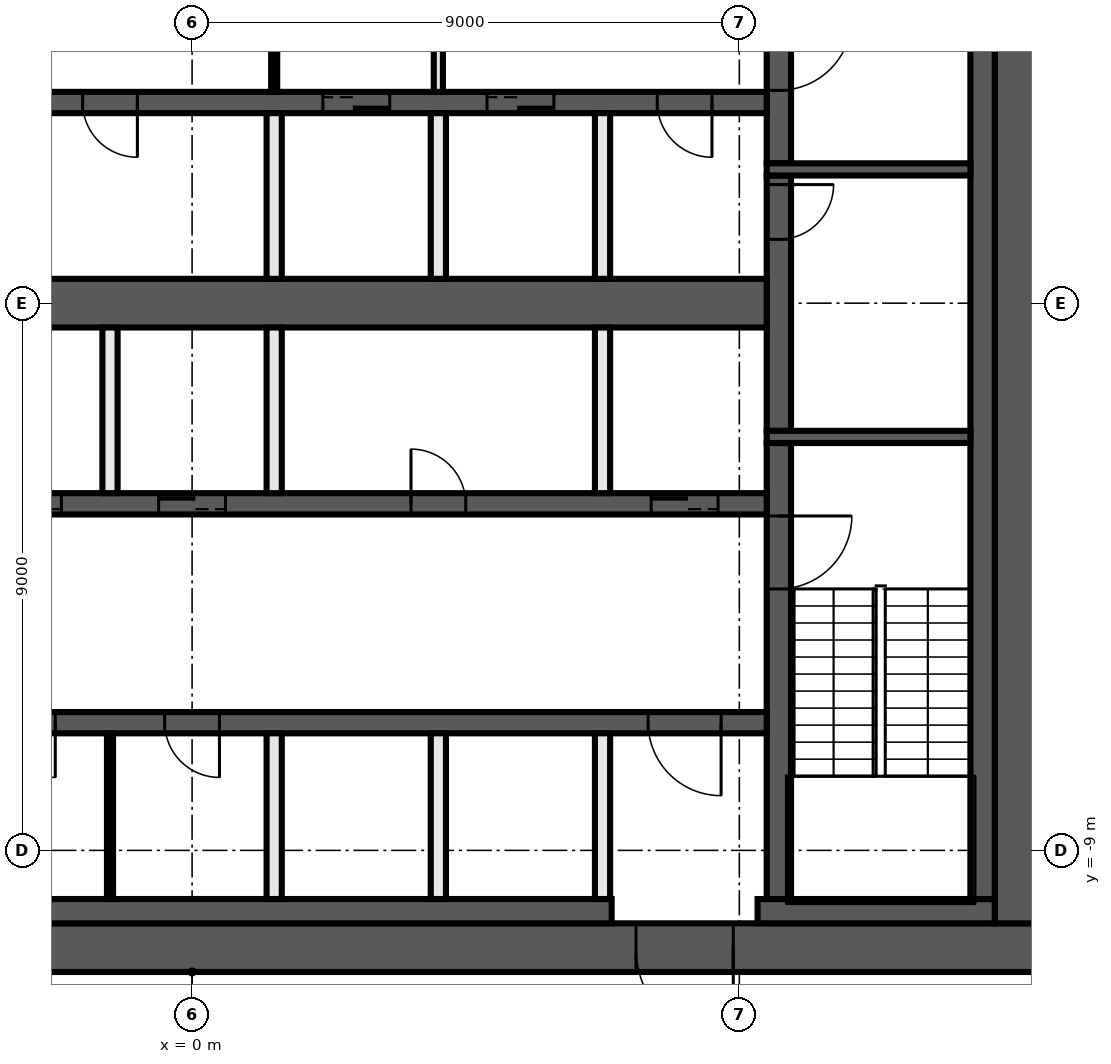
"""IFC4 building model, lengths in metres.
Left out: names, types, materials, properties, quantities, classifications, styles, units other than length and angle.
Written with IfcOpenShell. Run it as: python <this file> out.ifc"""

import sys

from ifc_helpers import new_model, si_unit, direction, frame, frame_2d, origin, place, context, subcontext, project, spatial, rectangle, extrude, element, fill, save


model = new_model("IFC4")
c1 = context("Model", 3, precision=1e-05, world=origin(), true_north=direction((0.0, 1.0)))
c2 = subcontext(c1, "Body", "Model", "MODEL_VIEW")
j1 = project(units=[si_unit("LENGTHUNIT", "METRE"), si_unit("PLANEANGLEUNIT", "RADIAN")], contexts=[c1])
p1 = place(None, origin())
s1 = spatial("IfcSite", under=j1, at=p1, CompositionType="ELEMENT")
p2 = place(p1, origin())
s2 = spatial("IfcBuilding", under=s1, at=p2, CompositionType="ELEMENT")
p3 = place(p2, frame((0.0, 0.0, 211.4)))
s3 = spatial("IfcBuildingStorey", under=s2, at=p3, CompositionType="ELEMENT", Elevation=211.4)
p4 = place(p3, frame((14.0, -10.6, 0.0), z_axis=(0.0, 0.0, 1.0), x_axis=(-1.0, 0.0, 0.0)))
e1 = element("IfcWall", 1, at=p4, inside=s3, PredefinedType="SHEAR", context=c2, shape_type="SweptSolid", body=[
    extrude(rectangle(XDim=28.0, YDim=0.8, at=frame_2d((14.0, 0.0))), origin(), (0.0, 0.0, 1.0), 3.82),
])
p5 = place(p4, frame((5.1, 0.0, 0.0)))
e2 = element("IfcOpeningElement", 2, at=p5, cuts=e1, PredefinedType="OPENING", context=c2, shape_type="SweptSolid", body=[
    extrude(rectangle(XDim=1.6, YDim=2.1, at=frame_2d((0.8, 1.05))), frame((0.0, 0.41, 0.0), z_axis=(0.0, -1.0, 0.0), x_axis=(1.0, 0.0, 0.0)), (0.0, 0.0, 1.0), 0.82),
])
p6 = place(p3, frame((13.6, 10.2, 0.0), z_axis=(0.0, 0.0, 1.0), x_axis=(0.0, -1.0, 0.0)))
e3 = element("IfcWall", 3, at=p6, inside=s3, PredefinedType="SHEAR", context=c2, shape_type="SweptSolid", body=[
    extrude(rectangle(XDim=20.4, YDim=0.8, at=frame_2d((10.2, 0.0))), origin(), (0.0, 0.0, 1.0), 3.82),
])
p7 = place(p3, frame((13.2, -10.0, 0.0), z_axis=(0.0, 0.0, 1.0), x_axis=(-1.0, 0.0, 0.0)))
e4 = element("IfcWall", 4, at=p7, inside=s3, PredefinedType="SHEAR", context=c2, shape_type="SweptSolid", body=[
    extrude(rectangle(XDim=3.9, YDim=0.4, at=frame_2d((1.95, 0.0))), origin(), (0.0, 0.0, 1.0), 3.82),
])
p8 = place(p3, frame((6.9, -10.0, 0.0), z_axis=(0.0, 0.0, 1.0), x_axis=(-1.0, 0.0, 0.0)))
e5 = element("IfcWall", 5, at=p8, inside=s3, PredefinedType="SHEAR", context=c2, shape_type="SweptSolid", body=[
    extrude(rectangle(XDim=20.1, YDim=0.4, at=frame_2d((10.05, 0.0))), origin(), (0.0, 0.0, 1.0), 3.82),
])
p9 = place(p3, frame((13.0, 9.8, 0.0), z_axis=(0.0, 0.0, 1.0), x_axis=(0.0, -1.0, 0.0)))
e6 = element("IfcWall", 6, at=p9, inside=s3, PredefinedType="SHEAR", context=c2, shape_type="SweptSolid", body=[
    extrude(rectangle(XDim=19.6, YDim=0.4, at=frame_2d((9.8, 0.0))), origin(), (0.0, 0.0, 1.0), 3.82),
])
p10 = place(p3, frame((9.65, -2.3, 0.0), z_axis=(0.0, 0.0, 1.0), x_axis=(0.0, -1.0, 0.0)))
e7 = element("IfcWall", 7, at=p10, inside=s3, PredefinedType="SHEAR", context=c2, shape_type="SweptSolid", body=[
    extrude(rectangle(XDim=7.5, YDim=0.4, at=frame_2d((3.75, 0.0))), origin(), (0.0, 0.0, 1.0), 3.82),
])
p11 = place(p10, frame((1.2, 0.0, 0.0)))
e8 = element("IfcOpeningElement", 8, at=p11, cuts=e7, PredefinedType="OPENING", context=c2, shape_type="SweptSolid", body=[
    extrude(rectangle(XDim=1.2, YDim=2.1, at=frame_2d((0.6, 1.05))), frame((0.0, 0.21, 0.0), z_axis=(0.0, -1.0, 0.0), x_axis=(1.0, 0.0, 0.0)), (0.0, 0.0, 1.0), 0.42),
])
p12 = place(p3, frame((9.65, 2.1, 0.0), z_axis=(0.0, 0.0, 1.0), x_axis=(0.0, -1.0, 0.0)))
e9 = element("IfcWall", 9, at=p12, inside=s3, PredefinedType="SHEAR", context=c2, shape_type="SweptSolid", body=[
    extrude(rectangle(XDim=4.2, YDim=0.4, at=frame_2d((2.1, 0.0))), origin(), (0.0, 0.0, 1.0), 3.82),
])
p13 = place(p12, frame((0.15, 0.0, 0.0)))
e10 = element("IfcOpeningElement", 10, at=p13, cuts=e9, PredefinedType="OPENING", context=c2, shape_type="SweptSolid", body=[
    extrude(rectangle(XDim=0.9, YDim=2.1, at=frame_2d((0.45, 1.05))), frame((0.0, 0.21, 0.0), z_axis=(0.0, -1.0, 0.0), x_axis=(1.0, 0.0, 0.0)), (0.0, 0.0, 1.0), 0.42),
])
p14 = place(p3, frame((9.65, 9.8, 0.0), z_axis=(0.0, 0.0, 1.0), x_axis=(0.0, -1.0, 0.0)))
e11 = element("IfcWall", 11, at=p14, inside=s3, PredefinedType="SHEAR", context=c2, shape_type="SweptSolid", body=[
    extrude(rectangle(XDim=7.5, YDim=0.4, at=frame_2d((3.75, 0.0))), origin(), (0.0, 0.0, 1.0), 3.82),
])
p15 = place(p14, frame((5.1, 0.0, 0.0)))
e12 = element("IfcOpeningElement", 12, at=p15, cuts=e11, PredefinedType="OPENING", context=c2, shape_type="SweptSolid", body=[
    extrude(rectangle(XDim=1.2, YDim=2.1, at=frame_2d((0.6, 1.05))), frame((0.0, 0.21, 0.0), z_axis=(0.0, -1.0, 0.0), x_axis=(1.0, 0.0, 0.0)), (0.0, 0.0, 1.0), 0.42),
])
for number, where, z_axis, x_axis in (
    (13, (9.45, 2.2, 0.0), (0.0, 0.0, 1.0), (1.0, 0.0, 0.0)),
    (14, (9.45, -2.2, 0.0), (0.0, 0.0, 1.0), (1.0, 0.0, 0.0)),
):
    element("IfcWall", number, at=place(p3, frame(where, z_axis=z_axis, x_axis=x_axis)), inside=s3, PredefinedType="SHEAR", context=c2, shape_type="SweptSolid", body=[
        extrude(rectangle(XDim=3.35, YDim=0.2, at=frame_2d((1.675, 0.0))), origin(), (0.0, 0.0, 1.0), 3.82),
    ])
p16 = place(p3, frame((9.45, 3.3, 0.0), z_axis=(0.0, 0.0, 1.0), x_axis=(-1.0, 0.0, 0.0)))
e15 = element("IfcWall", 15, at=p16, inside=s3, PredefinedType="SHEAR", context=c2, shape_type="SweptSolid", body=[
    extrude(rectangle(XDim=18.9, YDim=0.35, at=frame_2d((9.45, 0.0))), origin(), (0.0, 0.0, 1.0), 3.82),
])
p17 = place(p16, frame((6.2, 0.0, 0.0)))
e16 = element("IfcOpeningElement", 16, at=p17, cuts=e15, PredefinedType="OPENING", context=c2, shape_type="SweptSolid", body=[
    extrude(rectangle(XDim=1.1, YDim=2.1, at=frame_2d((0.55, 1.05))), frame((0.0, 0.185, 0.0), z_axis=(0.0, -1.0, 0.0), x_axis=(1.0, 0.0, 0.0)), (0.0, 0.0, 1.0), 0.37),
])
p18 = place(p16, frame((3.5, 0.0, 0.0)))
e17 = element("IfcOpeningElement", 17, at=p18, cuts=e15, PredefinedType="OPENING", context=c2, shape_type="SweptSolid", body=[
    extrude(rectangle(XDim=1.1, YDim=2.1, at=frame_2d((0.55, 1.05))), frame((0.0, 0.185, 0.0), z_axis=(0.0, -1.0, 0.0), x_axis=(1.0, 0.0, 0.0)), (0.0, 0.0, 1.0), 0.37),
])
p19 = place(p16, frame((0.9, 0.0, 0.0)))
e18 = element("IfcOpeningElement", 18, at=p19, cuts=e15, PredefinedType="OPENING", context=c2, shape_type="SweptSolid", body=[
    extrude(rectangle(XDim=0.9, YDim=2.1, at=frame_2d((0.45, 1.05))), frame((0.0, 0.185, 0.0), z_axis=(0.0, -1.0, 0.0), x_axis=(1.0, 0.0, 0.0)), (0.0, 0.0, 1.0), 0.37),
])
p20 = place(p16, frame((17.1, 0.0, 0.0)))
e19 = element("IfcOpeningElement", 19, at=p20, cuts=e15, PredefinedType="OPENING", context=c2, shape_type="SweptSolid", body=[
    extrude(rectangle(XDim=0.9, YDim=2.1, at=frame_2d((0.45, 1.05))), frame((0.0, 0.185, 0.0), z_axis=(0.0, -1.0, 0.0), x_axis=(1.0, 0.0, 0.0)), (0.0, 0.0, 1.0), 0.37),
])
p21 = place(p16, frame((14.4, 0.0, 0.0)))
e20 = element("IfcOpeningElement", 20, at=p21, cuts=e15, PredefinedType="OPENING", context=c2, shape_type="SweptSolid", body=[
    extrude(rectangle(XDim=0.9, YDim=2.1, at=frame_2d((0.45, 1.05))), frame((0.0, 0.185, 0.0), z_axis=(0.0, -1.0, 0.0), x_axis=(1.0, 0.0, 0.0)), (0.0, 0.0, 1.0), 0.37),
])
p22 = place(p16, frame((10.35, 0.0, 0.0)))
e21 = element("IfcOpeningElement", 21, at=p22, cuts=e15, PredefinedType="OPENING", context=c2, shape_type="SweptSolid", body=[
    extrude(rectangle(XDim=0.9, YDim=2.1, at=frame_2d((0.45, 1.05))), frame((0.0, 0.185, 0.0), z_axis=(0.0, -1.0, 0.0), x_axis=(1.0, 0.0, 0.0)), (0.0, 0.0, 1.0), 0.37),
])
p23 = place(p3, frame((-9.45, -3.3, 0.0), z_axis=(0.0, 0.0, 1.0), x_axis=(1.0, 0.0, 0.0)))
e22 = element("IfcWall", 22, at=p23, inside=s3, PredefinedType="SHEAR", context=c2, shape_type="SweptSolid", body=[
    extrude(rectangle(XDim=18.9, YDim=0.35, at=frame_2d((9.45, 0.0))), origin(), (0.0, 0.0, 1.0), 3.82),
])
p24 = place(p23, frame((0.8, 0.0, 0.0)))
e23 = element("IfcOpeningElement", 23, at=p24, cuts=e22, PredefinedType="OPENING", context=c2, shape_type="SweptSolid", body=[
    extrude(rectangle(XDim=1.1, YDim=2.1, at=frame_2d((0.55, 1.05))), frame((0.0, 0.185, 0.0), z_axis=(0.0, -1.0, 0.0), x_axis=(1.0, 0.0, 0.0)), (0.0, 0.0, 1.0), 0.37),
])
p25 = place(p23, frame((3.5, 0.0, 0.0)))
e24 = element("IfcOpeningElement", 24, at=p25, cuts=e22, PredefinedType="OPENING", context=c2, shape_type="SweptSolid", body=[
    extrude(rectangle(XDim=1.1, YDim=2.1, at=frame_2d((0.55, 1.05))), frame((0.0, 0.185, 0.0), z_axis=(0.0, -1.0, 0.0), x_axis=(1.0, 0.0, 0.0)), (0.0, 0.0, 1.0), 0.37),
])
p26 = place(p23, frame((6.2, 0.0, 0.0)))
e25 = element("IfcOpeningElement", 25, at=p26, cuts=e22, PredefinedType="OPENING", context=c2, shape_type="SweptSolid", body=[
    extrude(rectangle(XDim=1.1, YDim=2.1, at=frame_2d((0.55, 1.05))), frame((0.0, 0.185, 0.0), z_axis=(0.0, -1.0, 0.0), x_axis=(1.0, 0.0, 0.0)), (0.0, 0.0, 1.0), 0.37),
])
p27 = place(p23, frame((8.9, 0.0, 0.0)))
e26 = element("IfcOpeningElement", 26, at=p27, cuts=e22, PredefinedType="OPENING", context=c2, shape_type="SweptSolid", body=[
    extrude(rectangle(XDim=1.1, YDim=2.1, at=frame_2d((0.55, 1.05))), frame((0.0, 0.185, 0.0), z_axis=(0.0, -1.0, 0.0), x_axis=(1.0, 0.0, 0.0)), (0.0, 0.0, 1.0), 0.37),
])
p28 = place(p23, frame((17.0, 0.0, 0.0)))
e27 = element("IfcOpeningElement", 27, at=p28, cuts=e22, PredefinedType="OPENING", context=c2, shape_type="SweptSolid", body=[
    extrude(rectangle(XDim=1.1, YDim=2.1, at=frame_2d((0.55, 1.05))), frame((0.0, 0.185, 0.0), z_axis=(0.0, -1.0, 0.0), x_axis=(1.0, 0.0, 0.0)), (0.0, 0.0, 1.0), 0.37),
])
p29 = place(p23, frame((13.05, 0.0, 0.0)))
e28 = element("IfcOpeningElement", 28, at=p29, cuts=e22, PredefinedType="OPENING", context=c2, shape_type="SweptSolid", body=[
    extrude(rectangle(XDim=0.9, YDim=2.1, at=frame_2d((0.45, 1.05))), frame((0.0, 0.185, 0.0), z_axis=(0.0, -1.0, 0.0), x_axis=(1.0, 0.0, 0.0)), (0.0, 0.0, 1.0), 0.37),
])
p30 = place(p3, frame((9.45, -6.9, 0.0), z_axis=(0.0, 0.0, 1.0), x_axis=(-1.0, 0.0, 0.0)))
e29 = element("IfcWall", 29, at=p30, inside=s3, PredefinedType="SHEAR", context=c2, shape_type="SweptSolid", body=[
    extrude(rectangle(XDim=18.9, YDim=0.35, at=frame_2d((9.45, 0.0))), origin(), (0.0, 0.0, 1.0), 3.82),
])
p31 = place(p30, frame((0.75, 0.0, 0.0)))
e30 = element("IfcOpeningElement", 30, at=p31, cuts=e29, PredefinedType="OPENING", context=c2, shape_type="SweptSolid", body=[
    extrude(rectangle(XDim=1.2, YDim=2.1, at=frame_2d((0.6, 1.05))), frame((0.0, 0.185, 0.0), z_axis=(0.0, -1.0, 0.0), x_axis=(1.0, 0.0, 0.0)), (0.0, 0.0, 1.0), 0.37),
])
p32 = place(p30, frame((15.75, 0.0, 0.0)))
e31 = element("IfcOpeningElement", 31, at=p32, cuts=e29, PredefinedType="OPENING", context=c2, shape_type="SweptSolid", body=[
    extrude(rectangle(XDim=0.9, YDim=2.1, at=frame_2d((0.45, 1.05))), frame((0.0, 0.185, 0.0), z_axis=(0.0, -1.0, 0.0), x_axis=(1.0, 0.0, 0.0)), (0.0, 0.0, 1.0), 0.37),
])
p33 = place(p30, frame((11.7, 0.0, 0.0)))
e32 = element("IfcOpeningElement", 32, at=p33, cuts=e29, PredefinedType="OPENING", context=c2, shape_type="SweptSolid", body=[
    extrude(rectangle(XDim=0.9, YDim=2.1, at=frame_2d((0.45, 1.05))), frame((0.0, 0.185, 0.0), z_axis=(0.0, -1.0, 0.0), x_axis=(1.0, 0.0, 0.0)), (0.0, 0.0, 1.0), 0.37),
])
p34 = place(p30, frame((9.0, 0.0, 0.0)))
e33 = element("IfcOpeningElement", 33, at=p34, cuts=e29, PredefinedType="OPENING", context=c2, shape_type="SweptSolid", body=[
    extrude(rectangle(XDim=0.9, YDim=2.1, at=frame_2d((0.45, 1.05))), frame((0.0, 0.185, 0.0), z_axis=(0.0, -1.0, 0.0), x_axis=(1.0, 0.0, 0.0)), (0.0, 0.0, 1.0), 0.37),
])
p35 = place(p3, frame((-9.45, 0.0, 0.0), z_axis=(0.0, 0.0, 1.0), x_axis=(1.0, 0.0, 0.0)))
e34 = element("IfcWall", 34, at=p35, inside=s3, PredefinedType="SHEAR", context=c2, shape_type="SweptSolid", body=[
    extrude(rectangle(XDim=18.9, YDim=0.8, at=frame_2d((9.45, 0.0))), origin(), (0.0, 0.0, 1.0), 3.82),
])
for number, where, z_axis, x_axis in (
    (35, (6.75, -9.8, 0.0), (0.0, 0.0, 1.0), (0.0, 1.0, 0.0)),
    (36, (6.75, -3.125, 0.0), (0.0, 0.0, 1.0), (0.0, 1.0, 0.0)),
    (37, (6.75, 0.4, 0.0), (0.0, 0.0, 1.0), (0.0, 1.0, 0.0)),
):
    element("IfcWall", number, at=place(p3, frame(where, z_axis=z_axis, x_axis=x_axis)), inside=s3, PredefinedType="SOLIDWALL", context=c2, shape_type="SweptSolid", body=[
        extrude(rectangle(XDim=2.725, YDim=0.25, at=frame_2d((1.363, 0.0))), origin(), (0.0, 0.0, 1.0), 3.82),
    ])
p36 = place(p3, frame((4.05, 6.725, 0.0), z_axis=(0.0, 0.0, 1.0), x_axis=(0.0, -1.0, 0.0)))
e38 = element("IfcWall", 38, at=p36, inside=s3, PredefinedType="PARTITIONING", context=c2, shape_type="SweptSolid", body=[
    extrude(rectangle(XDim=3.25, YDim=0.15, at=frame_2d((1.625, 0.0))), origin(), (0.0, 0.0, 1.0), 3.82),
])
p37 = place(p36, frame((1.025, 0.0, 0.0)))
e39 = element("IfcOpeningElement", 39, at=p37, cuts=e38, PredefinedType="OPENING", context=c2, shape_type="SweptSolid", body=[
    extrude(rectangle(XDim=1.2, YDim=2.1, at=frame_2d((0.6, 1.05))), frame((0.0, 0.085, 0.0), z_axis=(0.0, -1.0, 0.0), x_axis=(1.0, 0.0, 0.0)), (0.0, 0.0, 1.0), 0.17),
])
for number, where, z_axis, x_axis in (
    (40, (4.05, -9.8, 0.0), (0.0, 0.0, 1.0), (0.0, 1.0, 0.0)),
    (41, (4.05, 0.4, 0.0), (0.0, 0.0, 1.0), (0.0, 1.0, 0.0)),
):
    element("IfcWall", number, at=place(p3, frame(where, z_axis=z_axis, x_axis=x_axis)), inside=s3, PredefinedType="SOLIDWALL", context=c2, shape_type="SweptSolid", body=[
        extrude(rectangle(XDim=2.725, YDim=0.25, at=frame_2d((1.363, 0.0))), origin(), (0.0, 0.0, 1.0), 3.82),
    ])
p38 = place(p3, frame((1.35, 6.725, 0.0), z_axis=(0.0, 0.0, 1.0), x_axis=(0.0, -1.0, 0.0)))
e42 = element("IfcWall", 42, at=p38, inside=s3, PredefinedType="PARTITIONING", context=c2, shape_type="SweptSolid", body=[
    extrude(rectangle(XDim=3.25, YDim=0.1, at=frame_2d((1.625, 0.0))), origin(), (0.0, 0.0, 1.0), 3.82),
])
p39 = place(p38, frame((1.025, 0.0, 0.0)))
e43 = element("IfcOpeningElement", 43, at=p39, cuts=e42, PredefinedType="OPENING", context=c2, shape_type="SweptSolid", body=[
    extrude(rectangle(XDim=1.2, YDim=2.1, at=frame_2d((0.6, 1.05))), frame((0.0, 0.06, 0.0), z_axis=(0.0, -1.0, 0.0), x_axis=(1.0, 0.0, 0.0)), (0.0, 0.0, 1.0), 0.12),
])
for number, where, z_axis, x_axis in (
    (44, (1.35, -9.8, 0.0), (0.0, 0.0, 1.0), (0.0, 1.0, 0.0)),
    (45, (1.35, -3.125, 0.0), (0.0, 0.0, 1.0), (0.0, 1.0, 0.0)),
    (46, (1.35, 0.4, 0.0), (0.0, 0.0, 1.0), (0.0, 1.0, 0.0)),
):
    element("IfcWall", number, at=place(p3, frame(where, z_axis=z_axis, x_axis=x_axis)), inside=s3, PredefinedType="SOLIDWALL", context=c2, shape_type="SweptSolid", body=[
        extrude(rectangle(XDim=2.725, YDim=0.25, at=frame_2d((1.363, 0.0))), origin(), (0.0, 0.0, 1.0), 3.82),
    ])
p40 = place(p3, frame((-1.35, -9.8, 0.0), z_axis=(0.0, 0.0, 1.0), x_axis=(0.0, 1.0, 0.0)))
e47 = element("IfcWall", 47, at=p40, inside=s3, PredefinedType="PARTITIONING", context=c2, shape_type="SweptSolid", body=[
    extrude(rectangle(XDim=2.725, YDim=0.1, at=frame_2d((1.363, 0.0))), origin(), (0.0, 0.0, 1.0), 3.82),
])
p41 = place(p3, frame((-1.35, -3.125, 0.0), z_axis=(0.0, 0.0, 1.0), x_axis=(0.0, 1.0, 0.0)))
e48 = element("IfcWall", 48, at=p41, inside=s3, PredefinedType="SOLIDWALL", context=c2, shape_type="SweptSolid", body=[
    extrude(rectangle(XDim=2.725, YDim=0.25, at=frame_2d((1.363, 0.0))), origin(), (0.0, 0.0, 1.0), 3.82),
])
p42 = place(p13, origin())
e49 = element("IfcDoor", 49, at=p42, inside=s3, OperationType="SINGLE_SWING_RIGHT", PredefinedType="DOOR", context=c2, shape_type="SweptSolid", body=[
    extrude(rectangle(XDim=0.9, YDim=2.1, at=frame_2d((0.45, 1.05))), frame((0.0, 0.025, 0.0), z_axis=(0.0, -1.0, 0.0), x_axis=(1.0, 0.0, 0.0)), (0.0, 0.0, 1.0), 0.05),
])
fill(e10, e49)
p43 = place(p17, origin())
e50 = element("IfcDoor", 50, at=p43, inside=s3, OperationType="DOUBLE_DOOR_SLIDING", PredefinedType="DOOR", context=c2, shape_type="SweptSolid", body=[
    extrude(rectangle(XDim=1.1, YDim=2.1, at=frame_2d((0.55, 1.05))), frame((0.0, 0.025, 0.0), z_axis=(0.0, -1.0, 0.0), x_axis=(1.0, 0.0, 0.0)), (0.0, 0.0, 1.0), 0.05),
])
fill(e16, e50)
p44 = place(p18, origin())
e51 = element("IfcDoor", 51, at=p44, inside=s3, OperationType="DOUBLE_DOOR_SLIDING", PredefinedType="DOOR", context=c2, shape_type="SweptSolid", body=[
    extrude(rectangle(XDim=1.1, YDim=2.1, at=frame_2d((0.55, 1.05))), frame((0.0, 0.025, 0.0), z_axis=(0.0, -1.0, 0.0), x_axis=(1.0, 0.0, 0.0)), (0.0, 0.0, 1.0), 0.05),
])
fill(e17, e51)
p45 = place(p19, origin())
e52 = element("IfcDoor", 52, at=p45, inside=s3, OperationType="SINGLE_SWING_LEFT", PredefinedType="DOOR", context=c2, shape_type="SweptSolid", body=[
    extrude(rectangle(XDim=0.9, YDim=2.1, at=frame_2d((0.45, 1.05))), frame((0.0, 0.025, 0.0), z_axis=(0.0, -1.0, 0.0), x_axis=(1.0, 0.0, 0.0)), (0.0, 0.0, 1.0), 0.05),
])
fill(e18, e52)
p46 = place(p26, origin())
e53 = element("IfcDoor", 53, at=p46, inside=s3, OperationType="DOUBLE_DOOR_SLIDING", PredefinedType="DOOR", context=c2, shape_type="SweptSolid", body=[
    extrude(rectangle(XDim=1.1, YDim=2.1, at=frame_2d((0.55, 1.05))), frame((0.0, 0.025, 0.0), z_axis=(0.0, -1.0, 0.0), x_axis=(1.0, 0.0, 0.0)), (0.0, 0.0, 1.0), 0.05),
])
fill(e25, e53)
p47 = place(p27, origin())
e54 = element("IfcDoor", 54, at=p47, inside=s3, OperationType="DOUBLE_DOOR_SLIDING", PredefinedType="DOOR", context=c2, shape_type="SweptSolid", body=[
    extrude(rectangle(XDim=1.1, YDim=2.1, at=frame_2d((0.55, 1.05))), frame((0.0, 0.025, 0.0), z_axis=(0.0, -1.0, 0.0), x_axis=(1.0, 0.0, 0.0)), (0.0, 0.0, 1.0), 0.05),
])
fill(e26, e54)
p48 = place(p28, origin())
e55 = element("IfcDoor", 55, at=p48, inside=s3, OperationType="DOUBLE_DOOR_SLIDING", PredefinedType="DOOR", context=c2, shape_type="SweptSolid", body=[
    extrude(rectangle(XDim=1.1, YDim=2.1, at=frame_2d((0.55, 1.05))), frame((0.0, 0.025, 0.0), z_axis=(0.0, -1.0, 0.0), x_axis=(1.0, 0.0, 0.0)), (0.0, 0.0, 1.0), 0.05),
])
fill(e27, e55)
p49 = place(p5, origin())
e56 = element("IfcDoor", 56, at=p49, inside=s3, OperationType="DOUBLE_DOOR_SINGLE_SWING", PredefinedType="DOOR", context=c2, shape_type="SweptSolid", body=[
    extrude(rectangle(XDim=1.6, YDim=2.1, at=frame_2d((0.8, 1.05))), frame((0.0, 0.025, 0.0), z_axis=(0.0, -1.0, 0.0), x_axis=(1.0, 0.0, 0.0)), (0.0, 0.0, 1.0), 0.05),
])
fill(e2, e56)
p50 = place(p31, origin())
e57 = element("IfcDoor", 57, at=p50, inside=s3, OperationType="SINGLE_SWING_LEFT", PredefinedType="DOOR", context=c2, shape_type="SweptSolid", body=[
    extrude(rectangle(XDim=1.2, YDim=2.1, at=frame_2d((0.6, 1.05))), frame((0.0, 0.025, 0.0), z_axis=(0.0, -1.0, 0.0), x_axis=(1.0, 0.0, 0.0)), (0.0, 0.0, 1.0), 0.05),
])
fill(e30, e57)
p51 = place(p22, origin())
e58 = element("IfcDoor", 58, at=p51, inside=s3, OperationType="SINGLE_SWING_LEFT", PredefinedType="DOOR", context=c2, shape_type="SweptSolid", body=[
    extrude(rectangle(XDim=0.9, YDim=2.1, at=frame_2d((0.45, 1.05))), frame((0.0, 0.025, 0.0), z_axis=(0.0, -1.0, 0.0), x_axis=(1.0, 0.0, 0.0)), (0.0, 0.0, 1.0), 0.05),
])
fill(e21, e58)
p52 = place(p29, origin())
e59 = element("IfcDoor", 59, at=p52, inside=s3, OperationType="SINGLE_SWING_RIGHT", PredefinedType="DOOR", context=c2, shape_type="SweptSolid", body=[
    extrude(rectangle(XDim=0.9, YDim=2.1, at=frame_2d((0.45, 1.05))), frame((0.0, 0.025, 0.0), z_axis=(0.0, -1.0, 0.0), x_axis=(1.0, 0.0, 0.0)), (0.0, 0.0, 1.0), 0.05),
])
fill(e28, e59)
p53 = place(p33, origin())
e60 = element("IfcDoor", 60, at=p53, inside=s3, OperationType="SINGLE_SWING_RIGHT", PredefinedType="DOOR", context=c2, shape_type="SweptSolid", body=[
    extrude(rectangle(XDim=0.9, YDim=2.1, at=frame_2d((0.45, 1.05))), frame((0.0, 0.025, 0.0), z_axis=(0.0, -1.0, 0.0), x_axis=(1.0, 0.0, 0.0)), (0.0, 0.0, 1.0), 0.05),
])
fill(e32, e60)
p54 = place(p34, origin())
e61 = element("IfcDoor", 61, at=p54, inside=s3, OperationType="SINGLE_SWING_LEFT", PredefinedType="DOOR", context=c2, shape_type="SweptSolid", body=[
    extrude(rectangle(XDim=0.9, YDim=2.1, at=frame_2d((0.45, 1.05))), frame((0.0, 0.025, 0.0), z_axis=(0.0, -1.0, 0.0), x_axis=(1.0, 0.0, 0.0)), (0.0, 0.0, 1.0), 0.05),
])
fill(e33, e61)
p55 = place(p15, origin())
e62 = element("IfcDoor", 62, at=p55, inside=s3, OperationType="SINGLE_SWING_LEFT", PredefinedType="DOOR", context=c2, shape_type="SweptSolid", body=[
    extrude(rectangle(XDim=1.2, YDim=2.1, at=frame_2d((0.6, 1.05))), frame((0.0, 0.025, 0.0), z_axis=(0.0, -1.0, 0.0), x_axis=(1.0, 0.0, 0.0)), (0.0, 0.0, 1.0), 0.05),
])
fill(e12, e62)
p56 = place(p11, origin())
e63 = element("IfcDoor", 63, at=p56, inside=s3, OperationType="SINGLE_SWING_RIGHT", PredefinedType="DOOR", context=c2, shape_type="SweptSolid", body=[
    extrude(rectangle(XDim=1.2, YDim=2.1, at=frame_2d((0.6, 1.05))), frame((0.0, 0.025, 0.0), z_axis=(0.0, -1.0, 0.0), x_axis=(1.0, 0.0, 0.0)), (0.0, 0.0, 1.0), 0.05),
])
fill(e8, e63)
save(model, sys.argv[1])
